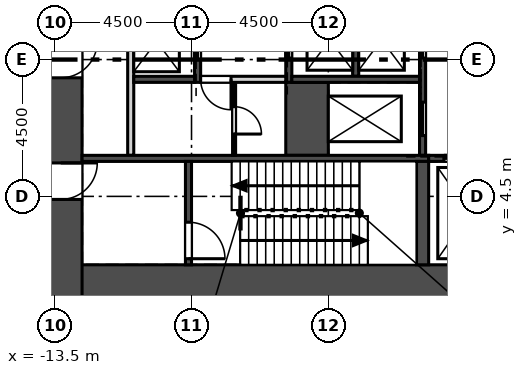
"""IFC4 building model, lengths in metres.
Left out: names, types, materials, properties, quantities, classifications, styles, units other than length and angle.
Written with IfcOpenShell. Run it as: python <this file> out.ifc"""

import sys

from ifc_helpers import new_model, si_unit, direction, frame, frame_2d, origin, place, context, subcontext, project, spatial, rectangle, extrude, element, fill, save


model = new_model("IFC4")
c1 = context("Model", 3, precision=1e-05, world=origin(), true_north=direction((0.0, 1.0)))
c2 = subcontext(c1, "Body", "Model", "MODEL_VIEW")
j1 = project(units=[si_unit("LENGTHUNIT", "METRE"), si_unit("PLANEANGLEUNIT", "RADIAN")], contexts=[c1])
p1 = place(None, origin())
s1 = spatial("IfcSite", under=j1, at=p1, CompositionType="ELEMENT")
p2 = place(p1, origin())
s2 = spatial("IfcBuilding", under=s1, at=p2, CompositionType="ELEMENT")
p3 = place(p2, frame((0.0, 0.0, 20.0)))
s3 = spatial("IfcBuildingStorey", under=s2, at=p3, CompositionType="ELEMENT", Elevation=20.0)
p4 = place(p3, frame((-14.0, 1.55, 0.0), z_axis=(0.0, 0.0, 1.0), x_axis=(1.0, 0.0, 0.0)))
e1 = element("IfcWall", 1, at=p4, inside=s3, PredefinedType="SHEAR", context=c2, shape_type="SweptSolid", body=[
    extrude(rectangle(XDim=28.0, YDim=1.4, at=frame_2d((14.0, 0.0))), origin(), (0.0, 0.0, 1.0), 5.0),
])
p5 = place(p3, frame((-13.3, 11.052, 0.0), z_axis=(0.0, 0.0, 1.0), x_axis=(0.0, -1.0, 0.0)))
e2 = element("IfcWall", 2, at=p5, inside=s3, PredefinedType="SHEAR", context=c2, shape_type="SweptSolid", body=[
    extrude(rectangle(XDim=10.202, YDim=1.4, at=frame_2d((5.101, 0.0))), origin(), (0.0, 0.0, 1.0), 5.0),
])
p6 = place(p5, frame((5.453, 0.0, 0.0)))
e3 = element("IfcOpeningElement", 3, at=p6, cuts=e2, PredefinedType="OPENING", context=c2, shape_type="SweptSolid", body=[
    extrude(rectangle(XDim=1.2, YDim=2.1, at=frame_2d((0.6, 1.05))), frame((0.0, 0.71, 0.0), z_axis=(0.0, -1.0, 0.0), x_axis=(1.0, 0.0, 0.0)), (0.0, 0.0, 1.0), 1.42),
])
p7 = place(p5, frame((1.453, 0.0, 0.0)))
e4 = element("IfcOpeningElement", 4, at=p7, cuts=e2, PredefinedType="OPENING", context=c2, shape_type="SweptSolid", body=[
    extrude(rectangle(XDim=1.2, YDim=2.1, at=frame_2d((0.6, 1.05))), frame((0.0, 0.71, 0.0), z_axis=(0.0, -1.0, 0.0), x_axis=(1.0, 0.0, 0.0)), (0.0, 0.0, 1.0), 1.42),
])
p8 = place(p3, frame((-4.853, 74.393, 0.0), z_axis=(0.0, 0.0, 1.0), x_axis=(-0.49999894854, -0.866026010844, 0.0)))
e5 = element("IfcWall", 5, at=p8, inside=s3, PredefinedType="SOLIDWALL", context=c2, shape_type="SweptSolid", body=[
    extrude(rectangle(XDim=76.0, YDim=0.34, at=frame_2d((38.0, 0.0))), origin(), (0.0, 0.0, 1.0), 3.0),
])
p9 = place(p8, frame((1.058, 0.0, 0.9)))
e6 = element("IfcOpeningElement", 6, at=p9, cuts=e5, PredefinedType="OPENING", context=c2, shape_type="SweptSolid", body=[
    extrude(rectangle(XDim=1.885, YDim=1.9, at=frame_2d((0.942, 0.95))), frame((0.0, 0.18, 0.0), z_axis=(0.0, -1.0, 0.0), x_axis=(1.0, 0.0, 0.0)), (0.0, 0.0, 1.0), 0.36),
])
p10 = place(p8, frame((4.058, 0.0, 0.9)))
e7 = element("IfcOpeningElement", 7, at=p10, cuts=e5, PredefinedType="OPENING", context=c2, shape_type="SweptSolid", body=[
    extrude(rectangle(XDim=1.885, YDim=1.9, at=frame_2d((0.942, 0.95))), frame((0.0, 0.18, 0.0), z_axis=(0.0, -1.0, 0.0), x_axis=(1.0, 0.0, 0.0)), (0.0, 0.0, 1.0), 0.36),
])
p11 = place(p8, frame((7.058, 0.0, 0.9)))
e8 = element("IfcOpeningElement", 8, at=p11, cuts=e5, PredefinedType="OPENING", context=c2, shape_type="SweptSolid", body=[
    extrude(rectangle(XDim=1.885, YDim=1.9, at=frame_2d((0.942, 0.95))), frame((0.0, 0.18, 0.0), z_axis=(0.0, -1.0, 0.0), x_axis=(1.0, 0.0, 0.0)), (0.0, 0.0, 1.0), 0.36),
])
p12 = place(p8, frame((10.058, 0.0, 0.9)))
e9 = element("IfcOpeningElement", 9, at=p12, cuts=e5, PredefinedType="OPENING", context=c2, shape_type="SweptSolid", body=[
    extrude(rectangle(XDim=1.885, YDim=1.9, at=frame_2d((0.942, 0.95))), frame((0.0, 0.18, 0.0), z_axis=(0.0, -1.0, 0.0), x_axis=(1.0, 0.0, 0.0)), (0.0, 0.0, 1.0), 0.36),
])
p13 = place(p8, frame((13.058, 0.0, 0.9)))
e10 = element("IfcOpeningElement", 10, at=p13, cuts=e5, PredefinedType="OPENING", context=c2, shape_type="SweptSolid", body=[
    extrude(rectangle(XDim=1.885, YDim=1.9, at=frame_2d((0.942, 0.95))), frame((0.0, 0.18, 0.0), z_axis=(0.0, -1.0, 0.0), x_axis=(1.0, 0.0, 0.0)), (0.0, 0.0, 1.0), 0.36),
])
p14 = place(p8, frame((16.058, 0.0, 0.9)))
e11 = element("IfcOpeningElement", 11, at=p14, cuts=e5, PredefinedType="OPENING", context=c2, shape_type="SweptSolid", body=[
    extrude(rectangle(XDim=1.885, YDim=1.9, at=frame_2d((0.942, 0.95))), frame((0.0, 0.18, 0.0), z_axis=(0.0, -1.0, 0.0), x_axis=(1.0, 0.0, 0.0)), (0.0, 0.0, 1.0), 0.36),
])
p15 = place(p8, frame((19.058, 0.0, 0.9)))
e12 = element("IfcOpeningElement", 12, at=p15, cuts=e5, PredefinedType="OPENING", context=c2, shape_type="SweptSolid", body=[
    extrude(rectangle(XDim=1.885, YDim=1.9, at=frame_2d((0.942, 0.95))), frame((0.0, 0.18, 0.0), z_axis=(0.0, -1.0, 0.0), x_axis=(1.0, 0.0, 0.0)), (0.0, 0.0, 1.0), 0.36),
])
p16 = place(p8, frame((22.058, 0.0, 0.9)))
e13 = element("IfcOpeningElement", 13, at=p16, cuts=e5, PredefinedType="OPENING", context=c2, shape_type="SweptSolid", body=[
    extrude(rectangle(XDim=1.885, YDim=1.9, at=frame_2d((0.942, 0.95))), frame((0.0, 0.18, 0.0), z_axis=(0.0, -1.0, 0.0), x_axis=(1.0, 0.0, 0.0)), (0.0, 0.0, 1.0), 0.36),
])
p17 = place(p8, frame((25.058, 0.0, 0.9)))
e14 = element("IfcOpeningElement", 14, at=p17, cuts=e5, PredefinedType="OPENING", context=c2, shape_type="SweptSolid", body=[
    extrude(rectangle(XDim=1.885, YDim=1.9, at=frame_2d((0.942, 0.95))), frame((0.0, 0.18, 0.0), z_axis=(0.0, -1.0, 0.0), x_axis=(1.0, 0.0, 0.0)), (0.0, 0.0, 1.0), 0.36),
])
p18 = place(p8, frame((28.058, 0.0, 0.9)))
e15 = element("IfcOpeningElement", 15, at=p18, cuts=e5, PredefinedType="OPENING", context=c2, shape_type="SweptSolid", body=[
    extrude(rectangle(XDim=1.885, YDim=1.9, at=frame_2d((0.942, 0.95))), frame((0.0, 0.18, 0.0), z_axis=(0.0, -1.0, 0.0), x_axis=(1.0, 0.0, 0.0)), (0.0, 0.0, 1.0), 0.36),
])
p19 = place(p8, frame((31.058, 0.0, 0.9)))
e16 = element("IfcOpeningElement", 16, at=p19, cuts=e5, PredefinedType="OPENING", context=c2, shape_type="SweptSolid", body=[
    extrude(rectangle(XDim=1.885, YDim=1.9, at=frame_2d((0.942, 0.95))), frame((0.0, 0.18, 0.0), z_axis=(0.0, -1.0, 0.0), x_axis=(1.0, 0.0, 0.0)), (0.0, 0.0, 1.0), 0.36),
])
p20 = place(p8, frame((34.058, 0.0, 0.9)))
e17 = element("IfcOpeningElement", 17, at=p20, cuts=e5, PredefinedType="OPENING", context=c2, shape_type="SweptSolid", body=[
    extrude(rectangle(XDim=1.885, YDim=1.9, at=frame_2d((0.942, 0.95))), frame((0.0, 0.18, 0.0), z_axis=(0.0, -1.0, 0.0), x_axis=(1.0, 0.0, 0.0)), (0.0, 0.0, 1.0), 0.36),
])
p21 = place(p8, frame((37.058, 0.0, 0.9)))
e18 = element("IfcOpeningElement", 18, at=p21, cuts=e5, PredefinedType="OPENING", context=c2, shape_type="SweptSolid", body=[
    extrude(rectangle(XDim=1.885, YDim=1.9, at=frame_2d((0.942, 0.95))), frame((0.0, 0.18, 0.0), z_axis=(0.0, -1.0, 0.0), x_axis=(1.0, 0.0, 0.0)), (0.0, 0.0, 1.0), 0.36),
])
p22 = place(p8, frame((40.058, 0.0, 0.9)))
e19 = element("IfcOpeningElement", 19, at=p22, cuts=e5, PredefinedType="OPENING", context=c2, shape_type="SweptSolid", body=[
    extrude(rectangle(XDim=1.885, YDim=1.9, at=frame_2d((0.942, 0.95))), frame((0.0, 0.18, 0.0), z_axis=(0.0, -1.0, 0.0), x_axis=(1.0, 0.0, 0.0)), (0.0, 0.0, 1.0), 0.36),
])
p23 = place(p8, frame((43.058, 0.0, 0.9)))
e20 = element("IfcOpeningElement", 20, at=p23, cuts=e5, PredefinedType="OPENING", context=c2, shape_type="SweptSolid", body=[
    extrude(rectangle(XDim=1.885, YDim=1.9, at=frame_2d((0.942, 0.95))), frame((0.0, 0.18, 0.0), z_axis=(0.0, -1.0, 0.0), x_axis=(1.0, 0.0, 0.0)), (0.0, 0.0, 1.0), 0.36),
])
p24 = place(p8, frame((46.058, 0.0, 0.9)))
e21 = element("IfcOpeningElement", 21, at=p24, cuts=e5, PredefinedType="OPENING", context=c2, shape_type="SweptSolid", body=[
    extrude(rectangle(XDim=1.885, YDim=1.9, at=frame_2d((0.942, 0.95))), frame((0.0, 0.18, 0.0), z_axis=(0.0, -1.0, 0.0), x_axis=(1.0, 0.0, 0.0)), (0.0, 0.0, 1.0), 0.36),
])
p25 = place(p8, frame((49.058, 0.0, 0.9)))
e22 = element("IfcOpeningElement", 22, at=p25, cuts=e5, PredefinedType="OPENING", context=c2, shape_type="SweptSolid", body=[
    extrude(rectangle(XDim=1.885, YDim=1.9, at=frame_2d((0.942, 0.95))), frame((0.0, 0.18, 0.0), z_axis=(0.0, -1.0, 0.0), x_axis=(1.0, 0.0, 0.0)), (0.0, 0.0, 1.0), 0.36),
])
p26 = place(p8, frame((52.058, 0.0, 0.9)))
e23 = element("IfcOpeningElement", 23, at=p26, cuts=e5, PredefinedType="OPENING", context=c2, shape_type="SweptSolid", body=[
    extrude(rectangle(XDim=1.885, YDim=1.9, at=frame_2d((0.942, 0.95))), frame((0.0, 0.18, 0.0), z_axis=(0.0, -1.0, 0.0), x_axis=(1.0, 0.0, 0.0)), (0.0, 0.0, 1.0), 0.36),
])
p27 = place(p8, frame((55.058, 0.0, 0.9)))
e24 = element("IfcOpeningElement", 24, at=p27, cuts=e5, PredefinedType="OPENING", context=c2, shape_type="SweptSolid", body=[
    extrude(rectangle(XDim=1.885, YDim=1.9, at=frame_2d((0.942, 0.95))), frame((0.0, 0.18, 0.0), z_axis=(0.0, -1.0, 0.0), x_axis=(1.0, 0.0, 0.0)), (0.0, 0.0, 1.0), 0.36),
])
p28 = place(p8, frame((58.058, 0.0, 0.9)))
e25 = element("IfcOpeningElement", 25, at=p28, cuts=e5, PredefinedType="OPENING", context=c2, shape_type="SweptSolid", body=[
    extrude(rectangle(XDim=1.885, YDim=1.9, at=frame_2d((0.942, 0.95))), frame((0.0, 0.18, 0.0), z_axis=(0.0, -1.0, 0.0), x_axis=(1.0, 0.0, 0.0)), (0.0, 0.0, 1.0), 0.36),
])
p29 = place(p8, frame((61.058, 0.0, 0.9)))
e26 = element("IfcOpeningElement", 26, at=p29, cuts=e5, PredefinedType="OPENING", context=c2, shape_type="SweptSolid", body=[
    extrude(rectangle(XDim=1.885, YDim=1.9, at=frame_2d((0.942, 0.95))), frame((0.0, 0.18, 0.0), z_axis=(0.0, -1.0, 0.0), x_axis=(1.0, 0.0, 0.0)), (0.0, 0.0, 1.0), 0.36),
])
p30 = place(p8, frame((64.058, 0.0, 0.9)))
e27 = element("IfcOpeningElement", 27, at=p30, cuts=e5, PredefinedType="OPENING", context=c2, shape_type="SweptSolid", body=[
    extrude(rectangle(XDim=1.885, YDim=1.9, at=frame_2d((0.942, 0.95))), frame((0.0, 0.18, 0.0), z_axis=(0.0, -1.0, 0.0), x_axis=(1.0, 0.0, 0.0)), (0.0, 0.0, 1.0), 0.36),
])
p31 = place(p8, frame((67.058, 0.0, 0.9)))
e28 = element("IfcOpeningElement", 28, at=p31, cuts=e5, PredefinedType="OPENING", context=c2, shape_type="SweptSolid", body=[
    extrude(rectangle(XDim=1.885, YDim=1.9, at=frame_2d((0.942, 0.95))), frame((0.0, 0.18, 0.0), z_axis=(0.0, -1.0, 0.0), x_axis=(1.0, 0.0, 0.0)), (0.0, 0.0, 1.0), 0.36),
])
p32 = place(p8, frame((70.058, 0.0, 0.9)))
e29 = element("IfcOpeningElement", 29, at=p32, cuts=e5, PredefinedType="OPENING", context=c2, shape_type="SweptSolid", body=[
    extrude(rectangle(XDim=1.885, YDim=1.9, at=frame_2d((0.942, 0.95))), frame((0.0, 0.18, 0.0), z_axis=(0.0, -1.0, 0.0), x_axis=(1.0, 0.0, 0.0)), (0.0, 0.0, 1.0), 0.36),
])
p33 = place(p8, frame((73.058, 0.0, 0.9)))
e30 = element("IfcOpeningElement", 30, at=p33, cuts=e5, PredefinedType="OPENING", context=c2, shape_type="SweptSolid", body=[
    extrude(rectangle(XDim=1.885, YDim=1.9, at=frame_2d((0.942, 0.95))), frame((0.0, 0.18, 0.0), z_axis=(0.0, -1.0, 0.0), x_axis=(1.0, 0.0, 0.0)), (0.0, 0.0, 1.0), 0.36),
])
p34 = place(p3, frame((-11.0, 5.85, 0.0), z_axis=(0.0, 0.0, 1.0), x_axis=(0.0, 1.0, 0.0)))
e31 = element("IfcWall", 31, at=p34, inside=s3, PredefinedType="SOLIDWALL", context=c2, shape_type="SweptSolid", body=[
    extrude(rectangle(XDim=7.4, YDim=0.2, at=frame_2d((3.7, 0.0))), origin(), (0.0, 0.0, 1.0), 3.0),
])
p35 = place(p3, frame((-8.8, 8.25, -0.3), z_axis=(0.0, 0.0, 1.0), x_axis=(0.0, 1.0, 0.0)))
e32 = element("IfcWall", 32, at=p35, inside=s3, PredefinedType="SOLIDWALL", context=c2, shape_type="SweptSolid", body=[
    extrude(rectangle(XDim=5.2, YDim=0.2, at=frame_2d((2.6, 0.0))), origin(), (0.0, 0.0, 1.0), 3.3),
])
p36 = place(p35, frame((0.75, 0.0, 0.3)))
e33 = element("IfcOpeningElement", 33, at=p36, cuts=e32, PredefinedType="OPENING", context=c2, shape_type="SweptSolid", body=[
    extrude(rectangle(XDim=1.2, YDim=2.1, at=frame_2d((0.6, 1.05))), frame((0.0, 0.11, 0.0), z_axis=(0.0, -1.0, 0.0), x_axis=(1.0, 0.0, 0.0)), (0.0, 0.0, 1.0), 0.22),
])
p37 = place(p35, frame((3.25, 0.0, 0.3)))
e34 = element("IfcOpeningElement", 34, at=p37, cuts=e32, PredefinedType="OPENING", context=c2, shape_type="SweptSolid", body=[
    extrude(rectangle(XDim=1.2, YDim=2.1, at=frame_2d((0.6, 1.05))), frame((0.0, 0.11, 0.0), z_axis=(0.0, -1.0, 0.0), x_axis=(1.0, 0.0, 0.0)), (0.0, 0.0, 1.0), 0.22),
])
p38 = place(p3, frame((-5.8, 8.25, -0.3), z_axis=(0.0, 0.0, 1.0), x_axis=(0.0, 1.0, 0.0)))
e35 = element("IfcWall", 35, at=p38, inside=s3, PredefinedType="SOLIDWALL", context=c2, shape_type="SweptSolid", body=[
    extrude(rectangle(XDim=8.0, YDim=0.2, at=frame_2d((4.0, 0.0))), origin(), (0.0, 0.0, 1.0), 3.3),
])
p39 = place(p38, frame((0.8, 0.0, 0.3)))
e36 = element("IfcOpeningElement", 36, at=p39, cuts=e35, PredefinedType="OPENING", context=c2, shape_type="SweptSolid", body=[
    extrude(rectangle(XDim=1.2, YDim=2.1, at=frame_2d((0.6, 1.05))), frame((0.0, 0.11, 0.0), z_axis=(0.0, -1.0, 0.0), x_axis=(1.0, 0.0, 0.0)), (0.0, 0.0, 1.0), 0.22),
])
p40 = place(p38, frame((3.4, 0.0, 0.3)))
e37 = element("IfcOpeningElement", 37, at=p40, cuts=e35, PredefinedType="OPENING", context=c2, shape_type="SweptSolid", body=[
    extrude(rectangle(XDim=1.2, YDim=2.1, at=frame_2d((0.6, 1.05))), frame((0.0, 0.11, 0.0), z_axis=(0.0, -1.0, 0.0), x_axis=(1.0, 0.0, 0.0)), (0.0, 0.0, 1.0), 0.22),
])
p41 = place(p38, frame((6.0, 0.0, 0.3)))
e38 = element("IfcOpeningElement", 38, at=p41, cuts=e35, PredefinedType="OPENING", context=c2, shape_type="SweptSolid", body=[
    extrude(rectangle(XDim=1.2, YDim=2.1, at=frame_2d((0.6, 1.05))), frame((0.0, 0.11, 0.0), z_axis=(0.0, -1.0, 0.0), x_axis=(1.0, 0.0, 0.0)), (0.0, 0.0, 1.0), 0.22),
])
p42 = place(p3, frame((-3.6, 8.45, -0.3), z_axis=(0.0, 0.0, 1.0), x_axis=(0.0, 1.0, 0.0)))
e39 = element("IfcWall", 39, at=p42, inside=s3, PredefinedType="SOLIDWALL", context=c2, shape_type="SweptSolid", body=[
    extrude(rectangle(XDim=7.8, YDim=0.2, at=frame_2d((3.9, 0.0))), origin(), (0.0, 0.0, 1.0), 3.3),
])
p43 = place(p3, frame((-1.4, 5.85, -0.3), z_axis=(0.0, 0.0, 1.0), x_axis=(0.0, 1.0, 0.0)))
e40 = element("IfcWall", 40, at=p43, inside=s3, PredefinedType="SOLIDWALL", context=c2, shape_type="SweptSolid", body=[
    extrude(rectangle(XDim=11.75, YDim=0.2, at=frame_2d((5.875, 0.0))), origin(), (0.0, 0.0, 1.0), 3.3),
])
p44 = place(p43, frame((3.2, 0.0, 0.3)))
e41 = element("IfcOpeningElement", 41, at=p44, cuts=e40, PredefinedType="OPENING", context=c2, shape_type="SweptSolid", body=[
    extrude(rectangle(XDim=1.2, YDim=2.1, at=frame_2d((0.6, 1.05))), frame((0.0, 0.11, 0.0), z_axis=(0.0, -1.0, 0.0), x_axis=(1.0, 0.0, 0.0)), (0.0, 0.0, 1.0), 0.22),
])
p45 = place(p43, frame((0.65, 0.0, 0.3)))
e42 = element("IfcOpeningElement", 42, at=p45, cuts=e40, PredefinedType="OPENING", context=c2, shape_type="SweptSolid", body=[
    extrude(rectangle(XDim=1.1, YDim=2.1, at=frame_2d((0.55, 1.05))), frame((0.0, 0.11, 0.0), z_axis=(0.0, -1.0, 0.0), x_axis=(1.0, 0.0, 0.0)), (0.0, 0.0, 1.0), 0.22),
])
p46 = place(p3, frame((-5.2, 5.85, -0.3), z_axis=(0.0, 0.0, 1.0), x_axis=(0.0, 1.0, 0.0)))
e43 = element("IfcWall", 43, at=p46, inside=s3, PredefinedType="SOLIDWALL", context=c2, shape_type="SweptSolid", body=[
    extrude(rectangle(XDim=2.4, YDim=1.4, at=frame_2d((1.2, 0.0))), origin(), (0.0, 0.0, 1.0), 3.3),
])
p47 = place(p3, frame((-10.9, 8.35, -0.3), z_axis=(0.0, 0.0, 1.0), x_axis=(1.0, 0.0, 0.0)))
e44 = element("IfcWall", 44, at=p47, inside=s3, PredefinedType="SOLIDWALL", context=c2, shape_type="SweptSolid", body=[
    extrude(rectangle(XDim=2.0, YDim=0.2, at=frame_2d((1.0, 0.0))), origin(), (0.0, 0.0, 1.0), 3.3),
])
p48 = place(p3, frame((-5.7, 8.35, -0.3), z_axis=(0.0, 0.0, 1.0), x_axis=(1.0, 0.0, 0.0)))
e45 = element("IfcWall", 45, at=p48, inside=s3, PredefinedType="SOLIDWALL", context=c2, shape_type="SweptSolid", body=[
    extrude(rectangle(XDim=4.2, YDim=0.2, at=frame_2d((2.1, 0.0))), origin(), (0.0, 0.0, 1.0), 3.3),
])
p49 = place(p3, frame((-12.6, 5.75, -0.3), z_axis=(0.0, 0.0, 1.0), x_axis=(1.0, 0.0, 0.0)))
e46 = element("IfcWall", 46, at=p49, inside=s3, PredefinedType="SOLIDWALL", context=c2, shape_type="SweptSolid", body=[
    extrude(rectangle(XDim=11.4, YDim=0.2, at=frame_2d((5.7, 0.0))), origin(), (0.0, 0.0, 1.0), 3.3),
])
p50 = place(p3, frame((-1.2, 5.75, -0.3), z_axis=(0.0, 0.0, 1.0), x_axis=(1.0, 0.0, 0.0)))
e47 = element("IfcWall", 47, at=p50, inside=s3, PredefinedType="SOLIDWALL", context=c2, shape_type="SweptSolid", body=[
    extrude(rectangle(XDim=2.4, YDim=0.2, at=frame_2d((1.2, 0.0))), origin(), (0.0, 0.0, 1.0), 3.3),
])
p51 = place(p50, frame((0.5, 0.0, 0.3)))
e48 = element("IfcOpeningElement", 48, at=p51, cuts=e47, PredefinedType="OPENING", context=c2, shape_type="SweptSolid", body=[
    extrude(rectangle(XDim=1.4, YDim=2.1, at=frame_2d((0.7, 1.05))), frame((0.0, 0.11, 0.0), z_axis=(0.0, -1.0, 0.0), x_axis=(1.0, 0.0, 0.0)), (0.0, 0.0, 1.0), 0.22),
])
p52 = place(p3, frame((-9.1, 2.25, -0.3), z_axis=(0.0, 0.0, 1.0), x_axis=(0.0, 1.0, 0.0)))
e49 = element("IfcWall", 49, at=p52, inside=s3, PredefinedType="SOLIDWALL", context=c2, shape_type="SweptSolid", body=[
    extrude(rectangle(XDim=3.4, YDim=0.2, at=frame_2d((1.7, 0.0))), origin(), (0.0, 0.0, 1.0), 3.3),
])
p53 = place(p52, frame((0.2, 0.0, 0.3)))
e50 = element("IfcOpeningElement", 50, at=p53, cuts=e49, PredefinedType="OPENING", context=c2, shape_type="SweptSolid", body=[
    extrude(rectangle(XDim=1.2, YDim=2.1, at=frame_2d((0.6, 1.05))), frame((0.0, 0.11, 0.0), z_axis=(0.0, -1.0, 0.0), x_axis=(1.0, 0.0, 0.0)), (0.0, 0.0, 1.0), 0.22),
])
p54 = place(p3, frame((-1.4, 2.25, -0.3), z_axis=(0.0, 0.0, 1.0), x_axis=(0.0, 1.0, 0.0)))
e51 = element("IfcWall", 51, at=p54, inside=s3, PredefinedType="SOLIDWALL", context=c2, shape_type="SweptSolid", body=[
    extrude(rectangle(XDim=3.4, YDim=0.4, at=frame_2d((1.7, 0.0))), origin(), (0.0, 0.0, 1.0), 3.3),
])
p55 = place(p3, frame((-7.6, 5.85, 0.0), z_axis=(0.0, 0.0, 1.0), x_axis=(0.0, 1.0, 0.0)))
e52 = element("IfcWall", 52, at=p55, inside=s3, PredefinedType="PARTITIONING", context=c2, shape_type="SweptSolid", body=[
    extrude(rectangle(XDim=2.4, YDim=0.1, at=frame_2d((1.2, 0.0))), origin(), (0.0, 0.0, 1.0), 3.0),
])
p56 = place(p55, frame((0.7, 0.0, 0.0)))
e53 = element("IfcOpeningElement", 53, at=p56, cuts=e52, PredefinedType="OPENING", context=c2, shape_type="SweptSolid", body=[
    extrude(rectangle(XDim=0.9, YDim=2.1, at=frame_2d((0.45, 1.05))), frame((0.0, 0.06, 0.0), z_axis=(0.0, -1.0, 0.0), x_axis=(1.0, 0.0, 0.0)), (0.0, 0.0, 1.0), 0.12),
])
p57 = place(p3, frame((-8.7, 8.35, 0.0), z_axis=(0.0, 0.0, 1.0), x_axis=(1.0, 0.0, 0.0)))
e54 = element("IfcWall", 54, at=p57, inside=s3, PredefinedType="SOLIDWALL", context=c2, shape_type="SweptSolid", body=[
    extrude(rectangle(XDim=2.8, YDim=0.2, at=frame_2d((1.4, 0.0))), origin(), (0.0, 0.0, 1.0), 3.0),
])
p58 = place(p57, origin())
e55 = element("IfcOpeningElement", 55, at=p58, cuts=e54, PredefinedType="OPENING", context=c2, shape_type="SweptSolid", body=[
    extrude(rectangle(XDim=1.0, YDim=2.1, at=frame_2d((0.5, 1.05))), frame((0.0, 0.11, 0.0), z_axis=(0.0, -1.0, 0.0), x_axis=(1.0, 0.0, 0.0)), (0.0, 0.0, 1.0), 0.22),
])
p59 = place(p36, origin())
e56 = element("IfcDoor", 56, at=p59, inside=s3, OperationType="SLIDING_TO_LEFT", PredefinedType="DOOR", context=c2, shape_type="SweptSolid", body=[
    extrude(rectangle(XDim=1.2, YDim=2.1, at=frame_2d((0.6, 1.05))), frame((0.0, 0.025, 0.0), z_axis=(0.0, -1.0, 0.0), x_axis=(1.0, 0.0, 0.0)), (0.0, 0.0, 1.0), 0.05),
])
fill(e33, e56)
p60 = place(p39, origin())
e57 = element("IfcDoor", 57, at=p60, inside=s3, OperationType="SLIDING_TO_LEFT", PredefinedType="DOOR", context=c2, shape_type="SweptSolid", body=[
    extrude(rectangle(XDim=1.2, YDim=2.1, at=frame_2d((0.6, 1.05))), frame((0.0, 0.025, 0.0), z_axis=(0.0, -1.0, 0.0), x_axis=(1.0, 0.0, 0.0)), (0.0, 0.0, 1.0), 0.05),
])
fill(e36, e57)
p61 = place(p44, origin())
e58 = element("IfcDoor", 58, at=p61, inside=s3, OperationType="SLIDING_TO_LEFT", PredefinedType="DOOR", context=c2, shape_type="SweptSolid", body=[
    extrude(rectangle(XDim=1.2, YDim=2.1, at=frame_2d((0.6, 1.05))), frame((0.0, 0.025, 0.0), z_axis=(0.0, -1.0, 0.0), x_axis=(1.0, 0.0, 0.0)), (0.0, 0.0, 1.0), 0.05),
])
fill(e41, e58)
p62 = place(p45, origin())
e59 = element("IfcDoor", 59, at=p62, inside=s3, OperationType="SLIDING_TO_RIGHT", PredefinedType="DOOR", context=c2, shape_type="SweptSolid", body=[
    extrude(rectangle(XDim=1.1, YDim=2.1, at=frame_2d((0.55, 1.05))), frame((0.0, 0.025, 0.0), z_axis=(0.0, -1.0, 0.0), x_axis=(1.0, 0.0, 0.0)), (0.0, 0.0, 1.0), 0.05),
])
fill(e42, e59)
p63 = place(p51, origin())
e60 = element("IfcDoor", 60, at=p63, inside=s3, OperationType="SLIDING_TO_LEFT", PredefinedType="DOOR", context=c2, shape_type="SweptSolid", body=[
    extrude(rectangle(XDim=1.4, YDim=2.1, at=frame_2d((0.7, 1.05))), frame((0.0, 0.025, 0.0), z_axis=(0.0, -1.0, 0.0), x_axis=(1.0, 0.0, 0.0)), (0.0, 0.0, 1.0), 0.05),
])
fill(e48, e60)
p64 = place(p58, frame((1.0, 0.0, 0.0), z_axis=(0.0, 0.0, 1.0), x_axis=(-1.0, 0.0, 0.0)))
e61 = element("IfcDoor", 61, at=p64, inside=s3, OperationType="SINGLE_SWING_LEFT", PredefinedType="DOOR", context=c2, shape_type="SweptSolid", body=[
    extrude(rectangle(XDim=1.0, YDim=2.1, at=frame_2d((0.5, 1.05))), frame((0.0, 0.025, 0.0), z_axis=(0.0, -1.0, 0.0), x_axis=(1.0, 0.0, 0.0)), (0.0, 0.0, 1.0), 0.05),
])
fill(e55, e61)
p65 = place(p56, frame((0.9, 0.0, 0.0), z_axis=(0.0, 0.0, 1.0), x_axis=(-1.0, 0.0, 0.0)))
e62 = element("IfcDoor", 62, at=p65, inside=s3, OperationType="SINGLE_SWING_RIGHT", PredefinedType="DOOR", context=c2, shape_type="SweptSolid", body=[
    extrude(rectangle(XDim=0.9, YDim=2.1, at=frame_2d((0.45, 1.05))), frame((0.0, 0.025, 0.0), z_axis=(0.0, -1.0, 0.0), x_axis=(1.0, 0.0, 0.0)), (0.0, 0.0, 1.0), 0.05),
])
fill(e53, e62)
p66 = place(p6, origin())
e63 = element("IfcDoor", 63, at=p66, inside=s3, OperationType="SINGLE_SWING_LEFT", PredefinedType="DOOR", context=c2, shape_type="SweptSolid", body=[
    extrude(rectangle(XDim=1.2, YDim=2.1, at=frame_2d((0.6, 1.05))), frame((0.0, 0.025, 0.0), z_axis=(0.0, -1.0, 0.0), x_axis=(1.0, 0.0, 0.0)), (0.0, 0.0, 1.0), 0.05),
])
fill(e3, e63)
p67 = place(p53, frame((1.2, 0.0, 0.0), z_axis=(0.0, 0.0, 1.0), x_axis=(-1.0, 0.0, 0.0)))
e64 = element("IfcDoor", 64, at=p67, inside=s3, OperationType="SINGLE_SWING_RIGHT", PredefinedType="DOOR", context=c2, shape_type="SweptSolid", body=[
    extrude(rectangle(XDim=1.2, YDim=2.1, at=frame_2d((0.6, 1.05))), frame((0.0, 0.025, 0.0), z_axis=(0.0, -1.0, 0.0), x_axis=(1.0, 0.0, 0.0)), (0.0, 0.0, 1.0), 0.05),
])
fill(e50, e64)
p68 = place(p7, origin())
e65 = element("IfcDoor", 65, at=p68, inside=s3, OperationType="SINGLE_SWING_LEFT", PredefinedType="DOOR", context=c2, shape_type="SweptSolid", body=[
    extrude(rectangle(XDim=1.2, YDim=2.1, at=frame_2d((0.6, 1.05))), frame((0.0, 0.025, 0.0), z_axis=(0.0, -1.0, 0.0), x_axis=(1.0, 0.0, 0.0)), (0.0, 0.0, 1.0), 0.05),
])
fill(e4, e65)
save(model, sys.argv[1])
